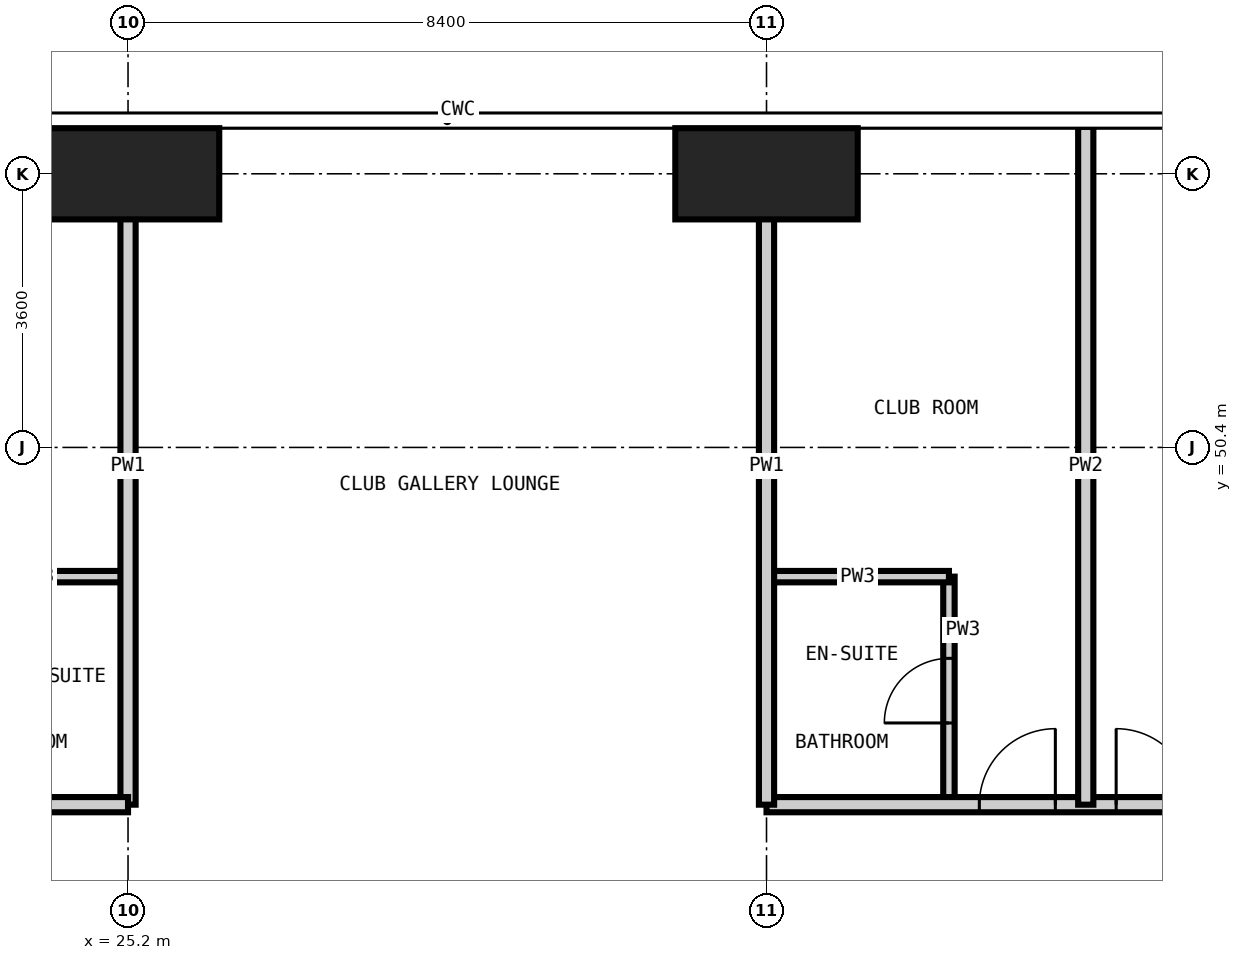
"""IFC4 building model, lengths in metres.
Left out: names, types, materials, properties, quantities, classifications, styles, units other than length and angle.
Written with IfcOpenShell. Run it as: python <this file> out.ifc"""

import sys

from ifc_helpers import new_model, si_unit, direction, frame, frame_2d, origin, origin_2d, place, context, subcontext, project, spatial, rectangle, extrude, element, fill, save


model = new_model("IFC4")
c1 = context("Model", 3, precision=1e-05, world=origin(), true_north=direction((0.0, 1.0)))
c2 = subcontext(c1, "Body", "Model", "MODEL_VIEW")
j1 = project(units=[si_unit("LENGTHUNIT", "METRE"), si_unit("PLANEANGLEUNIT", "RADIAN")], contexts=[c1])
p1 = place(None, origin())
s1 = spatial("IfcSite", under=j1, at=p1, CompositionType="ELEMENT")
p2 = place(p1, origin())
s2 = spatial("IfcBuilding", under=s1, at=p2, CompositionType="ELEMENT")
p3 = place(p2, frame((0.0, 0.0, 159.0)))
s3 = spatial("IfcBuildingStorey", under=s2, at=p3, CompositionType="ELEMENT", Elevation=159.0)
for number, where, z_axis, x_axis in (
    (1, (25.2, 54.0, -0.35), (0.0, 0.0, 1.0), (1.0, 0.0, 0.0)),
    (2, (33.6, 54.0, -0.35), (0.0, 0.0, 1.0), (1.0, 0.0, 0.0)),
):
    element("IfcColumn", number, at=place(p3, frame(where, z_axis=z_axis, x_axis=x_axis)), inside=s3, PredefinedType="COLUMN", context=c2, shape_type="SweptSolid", body=[
        extrude(rectangle(XDim=2.4, YDim=1.2, at=origin_2d()), origin(), (0.0, 0.0, 1.0), 3.6),
    ])
p4 = place(p3, frame((36.0, 45.7, 0.0), z_axis=(0.0, 0.0, 1.0), x_axis=(0.0, 1.0, 0.0)))
e3 = element("IfcWall", 3, at=p4, inside=s3, PredefinedType="PARTITIONING", context=c2, shape_type="SweptSolid", body=[
    extrude(rectangle(XDim=3.0, YDim=0.15, at=frame_2d((1.5, 0.0))), origin(), (0.0, 0.0, 1.0), 3.25),
])
p5 = place(p4, frame((1.075, 0.0, 0.0)))
e4 = element("IfcOpeningElement", 4, at=p5, cuts=e3, PredefinedType="OPENING", context=c2, shape_type="SweptSolid", body=[
    extrude(rectangle(XDim=0.85, YDim=2.1, at=frame_2d((0.425, 1.05))), frame((0.0, 0.085, 0.0), z_axis=(0.0, -1.0, 0.0), x_axis=(1.0, 0.0, 0.0)), (0.0, 0.0, 1.0), 0.17),
])
for number, where, z_axis, x_axis in (
    (5, (22.8, 48.7, 0.0), (0.0, 0.0, 1.0), (1.0, 0.0, 0.0)),
    (6, (33.6, 48.7, 0.0), (0.0, 0.0, 1.0), (1.0, 0.0, 0.0)),
):
    element("IfcWall", number, at=place(p3, frame(where, z_axis=z_axis, x_axis=x_axis)), inside=s3, PredefinedType="PARTITIONING", context=c2, shape_type="SweptSolid", body=[
        extrude(rectangle(XDim=2.4, YDim=0.15, at=frame_2d((1.2, 0.0))), origin(), (0.0, 0.0, 1.0), 3.25),
    ])
p6 = place(p3, frame((25.2, 45.7, 0.0), z_axis=(0.0, 0.0, 1.0), x_axis=(0.0, 1.0, 0.0)))
e7 = element("IfcWall", 7, at=p6, inside=s3, PredefinedType="PARTITIONING", context=c2, shape_type="SweptSolid", body=[
    extrude(rectangle(XDim=8.918, YDim=0.2, at=frame_2d((4.459, 0.0))), origin(), (0.0, 0.0, 1.0), 3.25),
])
p7 = place(p3, frame((14.3, 45.7, 0.0), z_axis=(0.0, 0.0, 1.0), x_axis=(1.0, 0.0, 0.0)))
e8 = element("IfcWall", 8, at=p7, inside=s3, PredefinedType="PARTITIONING", context=c2, shape_type="SweptSolid", body=[
    extrude(rectangle(XDim=10.9, YDim=0.2, at=frame_2d((5.45, 0.0))), origin(), (0.0, 0.0, 1.0), 3.25),
])
p8 = place(p7, frame((5.3, 0.0, 0.0)))
e9 = element("IfcOpeningElement", 9, at=p8, cuts=e8, PredefinedType="OPENING", context=c2, shape_type="SweptSolid", body=[
    extrude(rectangle(XDim=1.0, YDim=2.2, at=frame_2d((0.5, 1.1))), frame((0.0, 0.11, 0.0), z_axis=(0.0, -1.0, 0.0), x_axis=(1.0, 0.0, 0.0)), (0.0, 0.0, 1.0), 0.22),
])
p9 = place(p7, frame((7.1, 0.0, 0.0)))
e10 = element("IfcOpeningElement", 10, at=p9, cuts=e8, PredefinedType="OPENING", context=c2, shape_type="SweptSolid", body=[
    extrude(rectangle(XDim=1.0, YDim=2.2, at=frame_2d((0.5, 1.1))), frame((0.0, 0.11, 0.0), z_axis=(0.0, -1.0, 0.0), x_axis=(1.0, 0.0, 0.0)), (0.0, 0.0, 1.0), 0.22),
])
p10 = place(p3, frame((33.6, 45.7, 0.0), z_axis=(0.0, 0.0, 1.0), x_axis=(1.0, 0.0, 0.0)))
e11 = element("IfcWall", 11, at=p10, inside=s3, PredefinedType="PARTITIONING", context=c2, shape_type="SweptSolid", body=[
    extrude(rectangle(XDim=11.5, YDim=0.2, at=frame_2d((5.75, 0.0))), origin(), (0.0, 0.0, 1.0), 3.25),
])
p11 = place(p10, frame((2.8, 0.0, 0.0)))
e12 = element("IfcOpeningElement", 12, at=p11, cuts=e11, PredefinedType="OPENING", context=c2, shape_type="SweptSolid", body=[
    extrude(rectangle(XDim=1.0, YDim=2.2, at=frame_2d((0.5, 1.1))), frame((0.0, 0.11, 0.0), z_axis=(0.0, -1.0, 0.0), x_axis=(1.0, 0.0, 0.0)), (0.0, 0.0, 1.0), 0.22),
])
p12 = place(p10, frame((4.6, 0.0, 0.0)))
e13 = element("IfcOpeningElement", 13, at=p12, cuts=e11, PredefinedType="OPENING", context=c2, shape_type="SweptSolid", body=[
    extrude(rectangle(XDim=1.0, YDim=2.2, at=frame_2d((0.5, 1.1))), frame((0.0, 0.11, 0.0), z_axis=(0.0, -1.0, 0.0), x_axis=(1.0, 0.0, 0.0)), (0.0, 0.0, 1.0), 0.22),
])
for number, where, z_axis, x_axis in (
    (14, (33.6, 54.618, 0.0), (0.0, 0.0, 1.0), (0.0, -1.0, 0.0)),
    (15, (37.8, 45.7, 0.0), (0.0, 0.0, 1.0), (0.0, 1.0, 0.0)),
):
    element("IfcWall", number, at=place(p3, frame(where, z_axis=z_axis, x_axis=x_axis)), inside=s3, PredefinedType="PARTITIONING", context=c2, shape_type="SweptSolid", body=[
        extrude(rectangle(XDim=8.918, YDim=0.2, at=frame_2d((4.459, 0.0))), origin(), (0.0, 0.0, 1.0), 3.25),
    ])
p13 = place(p11, origin())
e16 = element("IfcDoor", 16, at=p13, inside=s3, OperationType="SINGLE_SWING_RIGHT", PredefinedType="DOOR", context=c2, shape_type="SweptSolid", body=[
    extrude(rectangle(XDim=1.0, YDim=2.2, at=frame_2d((0.5, 1.1))), frame((0.0, 0.025, 0.0), z_axis=(0.0, -1.0, 0.0), x_axis=(1.0, 0.0, 0.0)), (0.0, 0.0, 1.0), 0.05),
])
fill(e12, e16)
p14 = place(p5, origin())
e17 = element("IfcDoor", 17, at=p14, inside=s3, OperationType="SINGLE_SWING_LEFT", PredefinedType="DOOR", context=c2, shape_type="SweptSolid", body=[
    extrude(rectangle(XDim=0.85, YDim=2.1, at=frame_2d((0.425, 1.05))), frame((0.0, 0.025, 0.0), z_axis=(0.0, -1.0, 0.0), x_axis=(1.0, 0.0, 0.0)), (0.0, 0.0, 1.0), 0.05),
])
fill(e4, e17)
p15 = place(p12, origin())
e18 = element("IfcDoor", 18, at=p15, inside=s3, OperationType="SINGLE_SWING_LEFT", PredefinedType="DOOR", context=c2, shape_type="SweptSolid", body=[
    extrude(rectangle(XDim=1.0, YDim=2.2, at=frame_2d((0.5, 1.1))), frame((0.0, 0.025, 0.0), z_axis=(0.0, -1.0, 0.0), x_axis=(1.0, 0.0, 0.0)), (0.0, 0.0, 1.0), 0.05),
])
fill(e13, e18)
save(model, sys.argv[1])
